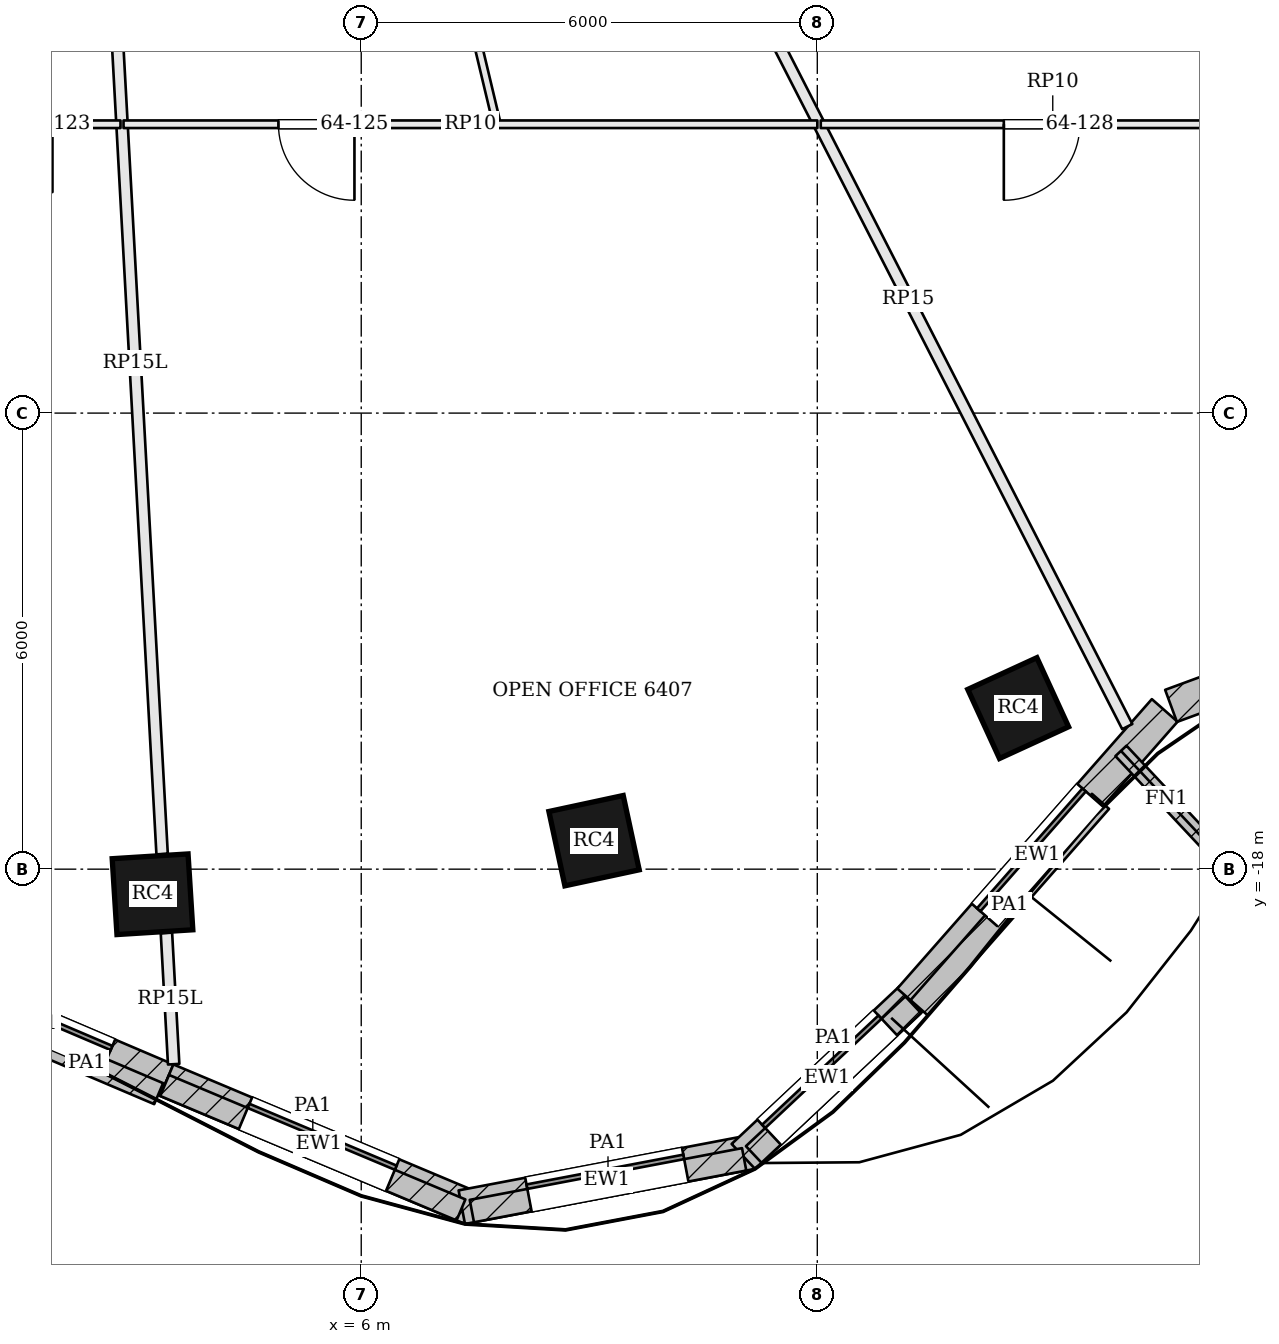
"""IFC4 building model, lengths in metres.
Left out: names, types, materials, properties, quantities, classifications, styles, units other than length and angle.
Written with IfcOpenShell. Run it as: python <this file> out.ifc"""

import sys

from ifc_helpers import new_model, si_unit, direction, frame, frame_2d, origin, origin_2d, place, context, subcontext, project, spatial, rectangle, extrude, element, fill, save


model = new_model("IFC4")
c1 = context("Model", 3, precision=1e-05, world=origin(), true_north=direction((0.0, 1.0)))
c2 = subcontext(c1, "Body", "Model", "MODEL_VIEW")
j1 = project(units=[si_unit("LENGTHUNIT", "METRE"), si_unit("PLANEANGLEUNIT", "RADIAN")], contexts=[c1])
p1 = place(None, origin())
s1 = spatial("IfcSite", under=j1, at=p1, CompositionType="ELEMENT")
p2 = place(p1, origin())
s2 = spatial("IfcBuilding", under=s1, at=p2, CompositionType="ELEMENT")
p3 = place(p2, frame((0.0, 0.0, 260.4)))
s3 = spatial("IfcBuildingStorey", under=s2, at=p3, CompositionType="ELEMENT", Elevation=260.4)
for number, where, z_axis, x_axis in (
    (1, (3.254, -18.33, 0.0), (0.0, 0.0, 1.0), (0.998, 0.063, 0.0)),
    (2, (9.063, -17.625, 0.0), (0.0, 0.0, 1.0), (0.978, 0.21, 0.0)),
    (3, (14.643, -15.881, 0.0), (0.0, 0.0, 1.0), (0.909, 0.417, 0.0)),
):
    element("IfcColumn", number, at=place(p3, frame(where, z_axis=z_axis, x_axis=x_axis)), inside=s3, PredefinedType="COLUMN", context=c2, shape_type="SweptSolid", body=[
        extrude(rectangle(XDim=1.0, YDim=1.0, at=origin_2d()), origin(), (0.0, 0.0, 1.0), 3.1),
    ])
p4 = place(p3, frame((-0.026, -19.299, 0.0), z_axis=(0.0, 0.0, 1.0), x_axis=(0.920040408927, -0.391823488245, 0.0)))
e4 = element("IfcWall", 4, at=p4, inside=s3, PredefinedType="SOLIDWALL", context=c2, shape_type="SweptSolid", body=[
    extrude(rectangle(XDim=3.77, YDim=0.45, at=frame_2d((1.885, 0.0))), origin(), (0.0, 0.0, 1.0), 3.6),
])
p5 = place(p4, frame((0.835, 0.0, 0.9)))
e5 = element("IfcOpeningElement", 5, at=p5, cuts=e4, PredefinedType="OPENING", context=c2, shape_type="SweptSolid", body=[
    extrude(rectangle(XDim=2.1, YDim=1.8, at=frame_2d((1.05, 0.9))), frame((0.0, 0.235, 0.0), z_axis=(0.0, -1.0, 0.0), x_axis=(1.0, 0.0, 0.0)), (0.0, 0.0, 1.0), 0.47),
])
p6 = place(p3, frame((3.441, -20.776, 0.0), z_axis=(0.0, 0.0, 1.0), x_axis=(0.921988121387, -0.387218160758, 0.0)))
e6 = element("IfcWall", 6, at=p6, inside=s3, PredefinedType="SOLIDWALL", context=c2, shape_type="SweptSolid", body=[
    extrude(rectangle(XDim=4.347, YDim=0.45, at=frame_2d((2.173, 0.0))), origin(), (0.0, 0.0, 1.0), 3.6),
])
p7 = place(p6, frame((1.123, 0.0, 0.9)))
e7 = element("IfcOpeningElement", 7, at=p7, cuts=e6, PredefinedType="OPENING", context=c2, shape_type="SweptSolid", body=[
    extrude(rectangle(XDim=2.1, YDim=1.8, at=frame_2d((1.05, 0.9))), frame((0.0, 0.235, 0.0), z_axis=(0.0, -1.0, 0.0), x_axis=(1.0, 0.0, 0.0)), (0.0, 0.0, 1.0), 0.47),
])
p8 = place(p3, frame((7.323, -22.447, 0.0), z_axis=(0.0, 0.0, 1.0), x_axis=(0.982420993638, 0.18667884524, 0.0)))
e8 = element("IfcWall", 8, at=p8, inside=s3, PredefinedType="SOLIDWALL", context=c2, shape_type="SweptSolid", body=[
    extrude(rectangle(XDim=3.884, YDim=0.45, at=frame_2d((1.942, 0.0))), origin(), (0.0, 0.0, 1.0), 3.6),
])
p9 = place(p8, frame((0.892, 0.0, 0.9)))
e9 = element("IfcOpeningElement", 9, at=p9, cuts=e8, PredefinedType="OPENING", context=c2, shape_type="SweptSolid", body=[
    extrude(rectangle(XDim=2.1, YDim=1.8, at=frame_2d((1.05, 0.9))), frame((0.0, 0.235, 0.0), z_axis=(0.0, -1.0, 0.0), x_axis=(1.0, 0.0, 0.0)), (0.0, 0.0, 1.0), 0.47),
])
p10 = place(p3, frame((11.027, -21.779, 0.0), z_axis=(0.0, 0.0, 1.0), x_axis=(0.728871214251, 0.684650825631, 0.0)))
e10 = element("IfcWall", 10, at=p10, inside=s3, PredefinedType="SOLIDWALL", context=c2, shape_type="SweptSolid", body=[
    extrude(rectangle(XDim=3.031, YDim=0.45, at=frame_2d((1.516, 0.0))), origin(), (0.0, 0.0, 1.0), 3.6),
])
p11 = place(p10, frame((0.466, 0.0, 0.9)))
e11 = element("IfcOpeningElement", 11, at=p11, cuts=e10, PredefinedType="OPENING", context=c2, shape_type="SweptSolid", body=[
    extrude(rectangle(XDim=2.1, YDim=1.8, at=frame_2d((1.05, 0.9))), frame((0.0, 0.235, 0.0), z_axis=(0.0, -1.0, 0.0), x_axis=(1.0, 0.0, 0.0)), (0.0, 0.0, 1.0), 0.47),
])
p12 = place(p3, frame((13.221, -19.719, 0.0), z_axis=(0.0, 0.0, 1.0), x_axis=(0.660424908916, 0.750892095899, 0.0)))
e12 = element("IfcWall", 12, at=p12, inside=s3, PredefinedType="SOLIDWALL", context=c2, shape_type="SweptSolid", body=[
    extrude(rectangle(XDim=5.071, YDim=0.45, at=frame_2d((2.535, 0.0))), origin(), (0.0, 0.0, 1.0), 3.6),
])
p13 = place(p12, frame((1.485, 0.0, 0.9)))
e13 = element("IfcOpeningElement", 13, at=p13, cuts=e12, PredefinedType="OPENING", context=c2, shape_type="SweptSolid", body=[
    extrude(rectangle(XDim=2.1, YDim=1.8, at=frame_2d((1.05, 0.9))), frame((0.0, 0.235, 0.0), z_axis=(0.0, -1.0, 0.0), x_axis=(1.0, 0.0, 0.0)), (0.0, 0.0, 1.0), 0.47),
])
p14 = place(p3, frame((16.654, -15.852, 0.0), z_axis=(0.0, 0.0, 1.0), x_axis=(0.938636568132, 0.344907803572, 0.0)))
e14 = element("IfcWall", 14, at=p14, inside=s3, PredefinedType="SOLIDWALL", context=c2, shape_type="SweptSolid", body=[
    extrude(rectangle(XDim=3.887, YDim=0.45, at=frame_2d((1.944, 0.0))), origin(), (0.0, 0.0, 1.0), 3.6),
])
p15 = place(p14, frame((0.894, 0.0, 0.9)))
e15 = element("IfcOpeningElement", 15, at=p15, cuts=e14, PredefinedType="OPENING", context=c2, shape_type="SweptSolid", body=[
    extrude(rectangle(XDim=2.1, YDim=1.8, at=frame_2d((1.05, 0.9))), frame((0.0, 0.235, 0.0), z_axis=(0.0, -1.0, 0.0), x_axis=(1.0, 0.0, 0.0)), (0.0, 0.0, 1.0), 0.47),
])
p16 = place(p3, frame((15.995, -16.444, 0.0), z_axis=(0.0, 0.0, 1.0), x_axis=(0.683852936488, -0.729619874494, 0.0)))
e16 = element("IfcWall", 16, at=p16, inside=s3, PredefinedType="SOLIDWALL", context=c2, shape_type="SweptSolid", body=[
    extrude(rectangle(XDim=1.75, YDim=0.2, at=frame_2d((0.875, 0.0))), origin(), (0.0, 0.0, 1.0), 3.6),
])
p17 = place(p3, frame((1.446, -20.149, 3.9), z_axis=(0.0, 0.0, 1.0), x_axis=(0.920058903695, -0.391780057854, 0.0)))
e17 = element("IfcWall", 17, at=p17, inside=s3, PredefinedType="PARAPET", context=c2, shape_type="SweptSolid", body=[
    extrude(rectangle(XDim=2.053, YDim=0.3, at=frame_2d((1.027, 0.0))), origin(), (0.0, 0.0, 1.0), 1.1),
])
p18 = place(p3, frame((3.413, -20.846, 3.9), z_axis=(0.0, 0.0, 1.0), x_axis=(0.921981693349, -0.387233465921, 0.0)))
e18 = element("IfcWall", 18, at=p18, inside=s3, PredefinedType="PARAPET", context=c2, shape_type="SweptSolid", body=[
    extrude(rectangle(XDim=4.229, YDim=0.3, at=frame_2d((2.114, 0.0))), origin(), (0.0, 0.0, 1.0), 1.1),
])
p19 = place(p3, frame((7.455, -22.498, 3.9), z_axis=(0.0, 0.0, 1.0), x_axis=(0.982412909305, 0.186721385038, 0.0)))
e19 = element("IfcWall", 19, at=p19, inside=s3, PredefinedType="PARAPET", context=c2, shape_type="SweptSolid", body=[
    extrude(rectangle(XDim=3.647, YDim=0.3, at=frame_2d((1.823, 0.0))), origin(), (0.0, 0.0, 1.0), 1.1),
])
p20 = place(p3, frame((11.164, -21.753, 3.9), z_axis=(0.0, 0.0, 1.0), x_axis=(0.72886475222, 0.684657704967, 0.0)))
e20 = element("IfcWall", 20, at=p20, inside=s3, PredefinedType="PARAPET", context=c2, shape_type="SweptSolid", body=[
    extrude(rectangle(XDim=2.877, YDim=0.3, at=frame_2d((1.438, 0.0))), origin(), (0.0, 0.0, 1.0), 1.1),
])
p21 = place(p3, frame((13.339, -19.822, 3.9), z_axis=(0.0, 0.0, 1.0), x_axis=(0.660443655688, 0.750875607316, 0.0)))
e21 = element("IfcWall", 21, at=p21, inside=s3, PredefinedType="PARAPET", context=c2, shape_type="SweptSolid", body=[
    extrude(rectangle(XDim=3.615, YDim=0.3, at=frame_2d((1.808, 0.0))), origin(), (0.0, 0.0, 1.0), 1.1),
])
p22 = place(p3, frame((3.532, -20.566, 0.0), z_axis=(0.0, 0.0, 1.0), x_axis=(-0.054930375168, 0.998490187175, 0.0)))
e22 = element("IfcWall", 22, at=p22, inside=s3, PredefinedType="PARTITIONING", context=c2, shape_type="SweptSolid", body=[
    extrude(rectangle(XDim=1.729, YDim=0.15, at=frame_2d((0.865, 0.0))), origin(), (0.0, 0.0, 1.0), 2.58),
])
p23 = place(p3, frame((3.38, -17.801, 0.0), z_axis=(0.0, 0.0, 1.0), x_axis=(-0.054879866406, 0.998492964554, 0.0)))
e23 = element("IfcWall", 23, at=p23, inside=s3, PredefinedType="PARTITIONING", context=c2, shape_type="SweptSolid", body=[
    extrude(rectangle(XDim=12.946, YDim=0.15, at=frame_2d((6.473, 0.0))), origin(), (0.0, 0.0, 1.0), 2.58),
])
p24 = place(p3, frame((16.078, -16.125, 0.0), z_axis=(0.0, 0.0, 1.0), x_axis=(-0.455549457852, 0.890210475927, 0.0)))
e24 = element("IfcWall", 24, at=p24, inside=s3, PredefinedType="PARTITIONING", context=c2, shape_type="SweptSolid", body=[
    extrude(rectangle(XDim=12.646, YDim=0.15, at=frame_2d((6.323, 0.0))), origin(), (0.0, 0.0, 1.0), 2.984),
])
p25 = place(p3, frame((2.833, -8.2, 0.0), z_axis=(0.0, 0.0, 1.0), x_axis=(-1.0, 0.0, 0.0)))
e25 = element("IfcWall", 25, at=p25, inside=s3, PredefinedType="PARTITIONING", context=c2, shape_type="SweptSolid", body=[
    extrude(rectangle(XDim=10.698, YDim=0.1, at=frame_2d((5.349, 0.0))), origin(), (0.0, 0.0, 1.0), 2.984),
])
p26 = place(p25, frame((7.748, 0.0, 0.0)))
e26 = element("IfcOpeningElement", 26, at=p26, cuts=e25, PredefinedType="OPENING", context=c2, shape_type="SweptSolid", body=[
    extrude(rectangle(XDim=1.0, YDim=2.1, at=frame_2d((0.5, 1.05))), frame((0.0, 0.06, 0.0), z_axis=(0.0, -1.0, 0.0), x_axis=(1.0, 0.0, 0.0)), (0.0, 0.0, 1.0), 0.12),
])
p27 = place(p25, frame((0.895, 0.0, 0.0)))
e27 = element("IfcOpeningElement", 27, at=p27, cuts=e25, PredefinedType="OPENING", context=c2, shape_type="SweptSolid", body=[
    extrude(rectangle(XDim=0.9, YDim=2.1, at=frame_2d((0.45, 1.05))), frame((0.0, 0.06, 0.0), z_axis=(0.0, -1.0, 0.0), x_axis=(1.0, 0.0, 0.0)), (0.0, 0.0, 1.0), 0.12),
])
p28 = place(p3, frame((12.001, -8.2, 0.0), z_axis=(0.0, 0.0, 1.0), x_axis=(-1.0, 0.0, 0.0)))
e28 = element("IfcWall", 28, at=p28, inside=s3, PredefinedType="PARTITIONING", context=c2, shape_type="SweptSolid", body=[
    extrude(rectangle(XDim=9.128, YDim=0.1, at=frame_2d((4.564, 0.0))), origin(), (0.0, 0.0, 1.0), 2.984),
])
p29 = place(p28, frame((6.09, 0.0, 0.0)))
e29 = element("IfcOpeningElement", 29, at=p29, cuts=e28, PredefinedType="OPENING", context=c2, shape_type="SweptSolid", body=[
    extrude(rectangle(XDim=1.0, YDim=2.1, at=frame_2d((0.5, 1.05))), frame((0.0, 0.06, 0.0), z_axis=(0.0, -1.0, 0.0), x_axis=(1.0, 0.0, 0.0)), (0.0, 0.0, 1.0), 0.12),
])
p30 = place(p3, frame((6.991, -4.873, 0.0), z_axis=(0.0, 0.0, 1.0), x_axis=(0.232348315027, -0.97263264417, 0.0)))
e30 = element("IfcWall", 30, at=p30, inside=s3, PredefinedType="PARTITIONING", context=c2, shape_type="SweptSolid", body=[
    extrude(rectangle(XDim=3.371, YDim=0.1, at=frame_2d((1.686, 0.0))), origin(), (0.0, 0.0, 1.0), 2.984),
])
p31 = place(p3, frame((18.15, -8.2, 0.0), z_axis=(0.0, 0.0, 1.0), x_axis=(-1.0, 0.0, 0.0)))
e31 = element("IfcWall", 31, at=p31, inside=s3, PredefinedType="PARTITIONING", context=c2, shape_type="SweptSolid", body=[
    extrude(rectangle(XDim=6.104, YDim=0.1, at=frame_2d((3.052, 0.0))), origin(), (0.0, 0.0, 1.0), 2.984),
])
p32 = place(p31, frame((2.696, 0.0, 0.0)))
e32 = element("IfcOpeningElement", 32, at=p32, cuts=e31, PredefinedType="OPENING", context=c2, shape_type="SweptSolid", body=[
    extrude(rectangle(XDim=1.0, YDim=2.1, at=frame_2d((0.5, 1.05))), frame((0.0, 0.06, 0.0), z_axis=(0.0, -1.0, 0.0), x_axis=(1.0, 0.0, 0.0)), (0.0, 0.0, 1.0), 0.12),
])
p33 = place(p3, frame((14.382, -4.844, 0.0), z_axis=(0.0, 0.0, 1.0), x_axis=(0.812905436978, -0.582395699273, 0.0)))
e33 = element("IfcWall", 33, at=p33, inside=s3, PredefinedType="PARTITIONING", context=c2, shape_type="SweptSolid", body=[
    extrude(rectangle(XDim=4.646, YDim=0.1, at=frame_2d((2.323, 0.0))), origin(), (0.0, 0.0, 1.0), 2.984),
])
p34 = place(p5, origin())
e34 = element("IfcWindow", 34, at=p34, inside=s3, PartitioningType="SINGLE_PANEL", PredefinedType="WINDOW", context=c2, shape_type="SweptSolid", body=[
    extrude(rectangle(XDim=2.1, YDim=1.8, at=frame_2d((1.05, 0.9))), frame((0.0, 0.135, 0.0), z_axis=(0.0, -1.0, 0.0), x_axis=(1.0, 0.0, 0.0)), (0.0, 0.0, 1.0), 0.06),
])
fill(e5, e34)
p35 = place(p7, origin())
e35 = element("IfcWindow", 35, at=p35, inside=s3, PartitioningType="SINGLE_PANEL", PredefinedType="WINDOW", context=c2, shape_type="SweptSolid", body=[
    extrude(rectangle(XDim=2.1, YDim=1.8, at=frame_2d((1.05, 0.9))), frame((0.0, 0.135, 0.0), z_axis=(0.0, -1.0, 0.0), x_axis=(1.0, 0.0, 0.0)), (0.0, 0.0, 1.0), 0.06),
])
fill(e7, e35)
p36 = place(p9, origin())
e36 = element("IfcWindow", 36, at=p36, inside=s3, PartitioningType="SINGLE_PANEL", PredefinedType="WINDOW", context=c2, shape_type="SweptSolid", body=[
    extrude(rectangle(XDim=2.1, YDim=1.8, at=frame_2d((1.05, 0.9))), frame((0.0, 0.135, 0.0), z_axis=(0.0, -1.0, 0.0), x_axis=(1.0, 0.0, 0.0)), (0.0, 0.0, 1.0), 0.06),
])
fill(e9, e36)
p37 = place(p11, origin())
e37 = element("IfcWindow", 37, at=p37, inside=s3, PartitioningType="SINGLE_PANEL", PredefinedType="WINDOW", context=c2, shape_type="SweptSolid", body=[
    extrude(rectangle(XDim=2.1, YDim=1.8, at=frame_2d((1.05, 0.9))), frame((0.0, 0.135, 0.0), z_axis=(0.0, -1.0, 0.0), x_axis=(1.0, 0.0, 0.0)), (0.0, 0.0, 1.0), 0.06),
])
fill(e11, e37)
p38 = place(p13, origin())
e38 = element("IfcWindow", 38, at=p38, inside=s3, PartitioningType="SINGLE_PANEL", PredefinedType="WINDOW", context=c2, shape_type="SweptSolid", body=[
    extrude(rectangle(XDim=2.1, YDim=1.8, at=frame_2d((1.05, 0.9))), frame((0.0, 0.135, 0.0), z_axis=(0.0, -1.0, 0.0), x_axis=(1.0, 0.0, 0.0)), (0.0, 0.0, 1.0), 0.06),
])
fill(e13, e38)
p39 = place(p27, origin())
e39 = element("IfcDoor", 39, at=p39, inside=s3, OperationType="SINGLE_SWING_LEFT", PredefinedType="DOOR", context=c2, shape_type="SweptSolid", body=[
    extrude(rectangle(XDim=0.9, YDim=2.1, at=frame_2d((0.45, 1.05))), frame((0.0, 0.025, 0.0), z_axis=(0.0, -1.0, 0.0), x_axis=(1.0, 0.0, 0.0)), (0.0, 0.0, 1.0), 0.05),
])
fill(e27, e39)
p40 = place(p29, origin())
e40 = element("IfcDoor", 40, at=p40, inside=s3, OperationType="SINGLE_SWING_LEFT", PredefinedType="DOOR", context=c2, shape_type="SweptSolid", body=[
    extrude(rectangle(XDim=1.0, YDim=2.1, at=frame_2d((0.5, 1.05))), frame((0.0, 0.025, 0.0), z_axis=(0.0, -1.0, 0.0), x_axis=(1.0, 0.0, 0.0)), (0.0, 0.0, 1.0), 0.05),
])
fill(e29, e40)
p41 = place(p32, origin())
e41 = element("IfcDoor", 41, at=p41, inside=s3, OperationType="SINGLE_SWING_RIGHT", PredefinedType="DOOR", context=c2, shape_type="SweptSolid", body=[
    extrude(rectangle(XDim=1.0, YDim=2.1, at=frame_2d((0.5, 1.05))), frame((0.0, 0.025, 0.0), z_axis=(0.0, -1.0, 0.0), x_axis=(1.0, 0.0, 0.0)), (0.0, 0.0, 1.0), 0.05),
])
fill(e32, e41)
save(model, sys.argv[1])
